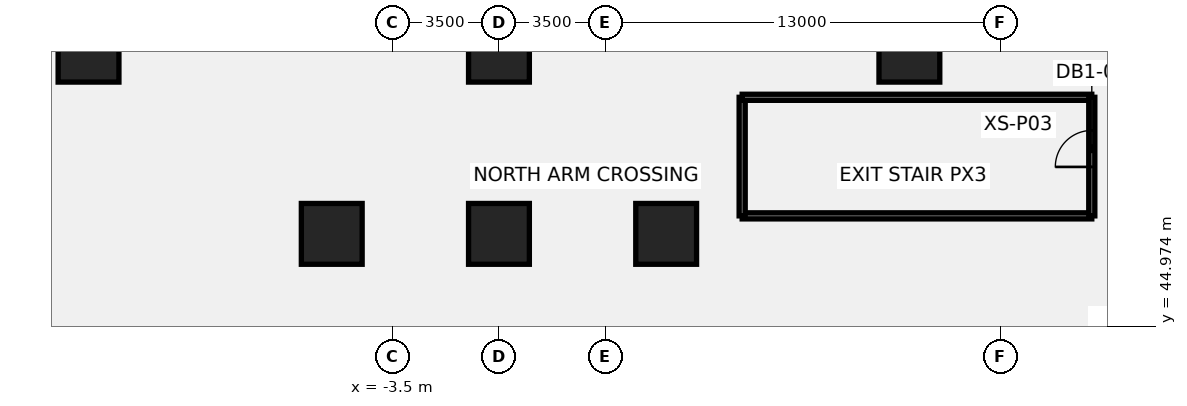
"""IFC4 building model, lengths in metres.
Left out: names, types, materials, properties, quantities, classifications, styles, units other than length and angle.
Written with IfcOpenShell. Run it as: python <this file> out.ifc"""

import sys

from ifc_helpers import new_model, si_unit, direction, frame, frame_2d, origin, origin_2d, place, context, subcontext, project, spatial, rectangle, extrude, element, fill, save


model = new_model("IFC4")
c1 = context("Model", 3, precision=1e-05, world=origin(), true_north=direction((0.0, 1.0)))
c2 = subcontext(c1, "Body", "Model", "MODEL_VIEW")
j1 = project(units=[si_unit("LENGTHUNIT", "METRE"), si_unit("PLANEANGLEUNIT", "RADIAN")], contexts=[c1])
p1 = place(None, origin())
s1 = spatial("IfcSite", under=j1, at=p1, CompositionType="ELEMENT")
p2 = place(p1, origin())
s2 = spatial("IfcBuilding", under=s1, at=p2, CompositionType="ELEMENT")
p3 = place(p2, frame((0.0, 0.0, -7.0)))
s3 = spatial("IfcBuildingStorey", under=s2, at=p3, CompositionType="ELEMENT", Elevation=-7.0)
for number, where, z_axis, x_axis in (
    (1, (5.5, 48.008, -0.45), (0.0, 0.0, 1.0), (1.0, 0.0, 0.0)),
    (2, (0.0, 48.008, -0.45), (0.0, 0.0, 1.0), (1.0, 0.0, 0.0)),
    (3, (-5.5, 48.008, -0.45), (0.0, 0.0, 1.0), (1.0, 0.0, 0.0)),
    (4, (-13.5, 54.0, -0.45), (0.0, 0.0, 1.0), (1.0, 0.0, 0.0)),
    (5, (0.0, 54.0, -0.45), (0.0, 0.0, 1.0), (1.0, 0.0, 0.0)),
    (6, (13.5, 54.0, -0.45), (0.0, 0.0, 1.0), (1.0, 0.0, 0.0)),
):
    element("IfcColumn", number, at=place(p3, frame(where, z_axis=z_axis, x_axis=x_axis)), inside=s3, PredefinedType="COLUMN", context=c2, shape_type="SweptSolid", body=[
        extrude(rectangle(XDim=2.0, YDim=2.0, at=origin_2d()), origin(), (0.0, 0.0, 1.0), 6.9),
    ])
p4 = place(p3, frame((8.0, 48.6, 0.0), z_axis=(0.0, 0.0, 1.0), x_axis=(1.0, 0.0, 0.0)))
e7 = element("IfcWall", 7, at=p4, inside=s3, PredefinedType="PARTITIONING", context=c2, shape_type="SweptSolid", body=[
    extrude(rectangle(XDim=11.5, YDim=0.2, at=frame_2d((5.75, 0.0))), origin(), (0.0, 0.0, 1.0), 6.45),
])
p5 = place(p3, frame((8.0, 48.6, 0.0), z_axis=(0.0, 0.0, 1.0), x_axis=(0.0, 1.0, 0.0)))
e8 = element("IfcWall", 8, at=p5, inside=s3, PredefinedType="PARTITIONING", context=c2, shape_type="SweptSolid", body=[
    extrude(rectangle(XDim=3.9, YDim=0.2, at=frame_2d((1.95, 0.0))), origin(), (0.0, 0.0, 1.0), 6.45),
])
p6 = place(p3, frame((8.0, 52.5, 0.0), z_axis=(0.0, 0.0, 1.0), x_axis=(1.0, 0.0, 0.0)))
e9 = element("IfcWall", 9, at=p6, inside=s3, PredefinedType="PARTITIONING", context=c2, shape_type="SweptSolid", body=[
    extrude(rectangle(XDim=11.5, YDim=0.2, at=frame_2d((5.75, 0.0))), origin(), (0.0, 0.0, 1.0), 6.45),
])
p7 = place(p3, frame((19.5, 48.6, 0.0), z_axis=(0.0, 0.0, 1.0), x_axis=(0.0, 1.0, 0.0)))
e10 = element("IfcWall", 10, at=p7, inside=s3, PredefinedType="PARTITIONING", context=c2, shape_type="SweptSolid", body=[
    extrude(rectangle(XDim=3.9, YDim=0.2, at=frame_2d((1.95, 0.0))), origin(), (0.0, 0.0, 1.0), 6.45),
])
p8 = place(p7, frame((1.61, 0.0, 0.0)))
e11 = element("IfcOpeningElement", 11, at=p8, cuts=e10, PredefinedType="OPENING", context=c2, shape_type="SweptSolid", body=[
    extrude(rectangle(XDim=1.2, YDim=2.1, at=frame_2d((0.6, 1.05))), frame((0.0, 0.11, 0.0), z_axis=(0.0, -1.0, 0.0), x_axis=(1.0, 0.0, 0.0)), (0.0, 0.0, 1.0), 0.22),
])
p9 = place(p8, origin())
e12 = element("IfcDoor", 12, at=p9, inside=s3, OperationType="SINGLE_SWING_LEFT", PredefinedType="DOOR", context=c2, shape_type="SweptSolid", body=[
    extrude(rectangle(XDim=1.2, YDim=2.1, at=frame_2d((0.6, 1.05))), frame((0.0, 0.025, 0.0), z_axis=(0.0, -1.0, 0.0), x_axis=(1.0, 0.0, 0.0)), (0.0, 0.0, 1.0), 0.05),
])
fill(e11, e12)
save(model, sys.argv[1])
